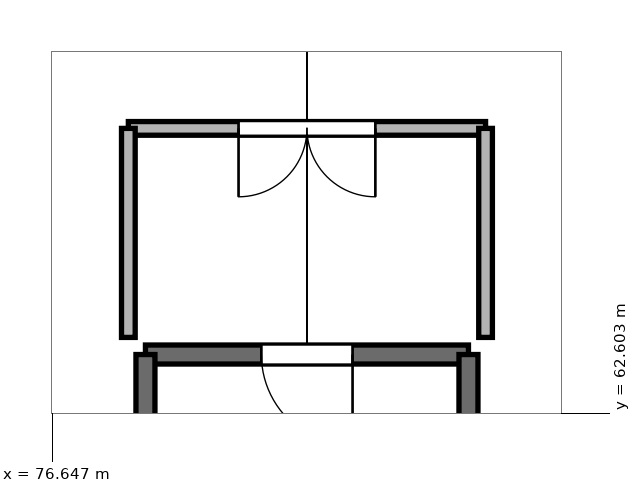
"""IFC4 building model, lengths in metres.
Left out: names, types, materials, properties, quantities, classifications, styles, units other than length and angle.
Written with IfcOpenShell. Run it as: python <this file> out.ifc"""

import sys

from ifc_helpers import new_model, si_unit, direction, frame, frame_2d, origin, place, context, subcontext, project, spatial, rectangle, extrude, element, fill, save


model = new_model("IFC4")
c1 = context("Model", 3, precision=1e-05, world=origin(), true_north=direction((0.0, 1.0)))
c2 = subcontext(c1, "Body", "Model", "MODEL_VIEW")
j1 = project(units=[si_unit("LENGTHUNIT", "METRE"), si_unit("PLANEANGLEUNIT", "RADIAN")], contexts=[c1])
p1 = place(None, origin())
s1 = spatial("IfcSite", under=j1, at=p1, CompositionType="ELEMENT")
p2 = place(p1, origin())
s2 = spatial("IfcBuilding", under=s1, at=p2, CompositionType="ELEMENT")
p3 = place(p2, frame((0.0, 0.0, 40.55)))
s3 = spatial("IfcBuildingStorey", under=s2, at=p3, CompositionType="ELEMENT", Elevation=40.55)
p4 = place(p3, frame((82.125, 63.375, 0.0), z_axis=(0.0, 0.0, 1.0), x_axis=(-1.0, 0.0, 0.0)))
e1 = element("IfcWall", 1, at=p4, inside=s3, PredefinedType="SHEAR", context=c2, shape_type="SweptSolid", body=[
    extrude(rectangle(XDim=4.25, YDim=0.25, at=frame_2d((2.125, 0.0))), origin(), (0.0, 0.0, 1.0), 3.01),
])
p5 = place(p4, frame((1.525, 0.0, 0.0)))
e2 = element("IfcOpeningElement", 2, at=p5, cuts=e1, PredefinedType="OPENING", context=c2, shape_type="SweptSolid", body=[
    extrude(rectangle(XDim=1.2, YDim=2.2, at=frame_2d((0.6, 1.1))), frame((0.0, 0.137, 0.0), z_axis=(0.0, -1.0, 0.0), x_axis=(1.0, 0.0, 0.0)), (0.0, 0.0, 1.0), 0.274),
])
for number, where, z_axis, x_axis in (
    (3, (77.875, 63.375, 0.0), (0.0, 0.0, 1.0), (0.0, -1.0, 0.0)),
    (4, (82.125, 56.175, 0.0), (0.0, 0.0, 1.0), (0.0, 1.0, 0.0)),
):
    element("IfcWall", number, at=place(p3, frame(where, z_axis=z_axis, x_axis=x_axis)), inside=s3, PredefinedType="SHEAR", context=c2, shape_type="SweptSolid", body=[
        extrude(rectangle(XDim=7.2, YDim=0.25, at=frame_2d((3.6, 0.0))), origin(), (0.0, 0.0, 1.0), 3.01),
    ])
p6 = place(p3, frame((77.65, 66.35, 0.0), z_axis=(0.0, 0.0, 1.0), x_axis=(1.0, 0.0, 0.0)))
e5 = element("IfcWall", 5, at=p6, inside=s3, PredefinedType="PARTITIONING", context=c2, shape_type="SweptSolid", body=[
    extrude(rectangle(XDim=4.7, YDim=0.18, at=frame_2d((2.35, 0.0))), origin(), (0.0, 0.0, 1.0), 2.53),
])
p7 = place(p6, frame((1.45, 0.0, 0.0)))
e6 = element("IfcOpeningElement", 6, at=p7, cuts=e5, PredefinedType="OPENING", context=c2, shape_type="SweptSolid", body=[
    extrude(rectangle(XDim=1.8, YDim=2.2, at=frame_2d((0.9, 1.1))), frame((0.0, 0.102, 0.0), z_axis=(0.0, -1.0, 0.0), x_axis=(1.0, 0.0, 0.0)), (0.0, 0.0, 1.0), 0.204),
])
for number, where, z_axis, x_axis in (
    (7, (77.65, 63.6, 0.0), (0.0, 0.0, 1.0), (0.0, 1.0, 0.0)),
    (8, (82.35, 63.6, 0.0), (0.0, 0.0, 1.0), (0.0, 1.0, 0.0)),
):
    element("IfcWall", number, at=place(p3, frame(where, z_axis=z_axis, x_axis=x_axis)), inside=s3, PredefinedType="PARTITIONING", context=c2, shape_type="SweptSolid", body=[
        extrude(rectangle(XDim=2.75, YDim=0.18, at=frame_2d((1.375, 0.0))), origin(), (0.0, 0.0, 1.0), 2.53),
    ])
p8 = place(p5, origin())
e9 = element("IfcDoor", 9, at=p8, inside=s3, OperationType="SINGLE_SWING_LEFT", PredefinedType="DOOR", context=c2, shape_type="SweptSolid", body=[
    extrude(rectangle(XDim=1.2, YDim=2.2, at=frame_2d((0.6, 1.1))), frame((0.0, 0.025, 0.0), z_axis=(0.0, -1.0, 0.0), x_axis=(1.0, 0.0, 0.0)), (0.0, 0.0, 1.0), 0.05),
])
fill(e2, e9)
p9 = place(p7, frame((1.8, 0.0, 0.0), z_axis=(0.0, 0.0, 1.0), x_axis=(-1.0, 0.0, 0.0)))
e10 = element("IfcDoor", 10, at=p9, inside=s3, OperationType="DOUBLE_DOOR_SINGLE_SWING", PredefinedType="DOOR", context=c2, shape_type="SweptSolid", body=[
    extrude(rectangle(XDim=1.8, YDim=2.2, at=frame_2d((0.9, 1.1))), frame((0.0, 0.025, 0.0), z_axis=(0.0, -1.0, 0.0), x_axis=(1.0, 0.0, 0.0)), (0.0, 0.0, 1.0), 0.05),
])
fill(e6, e10)
save(model, sys.argv[1])
